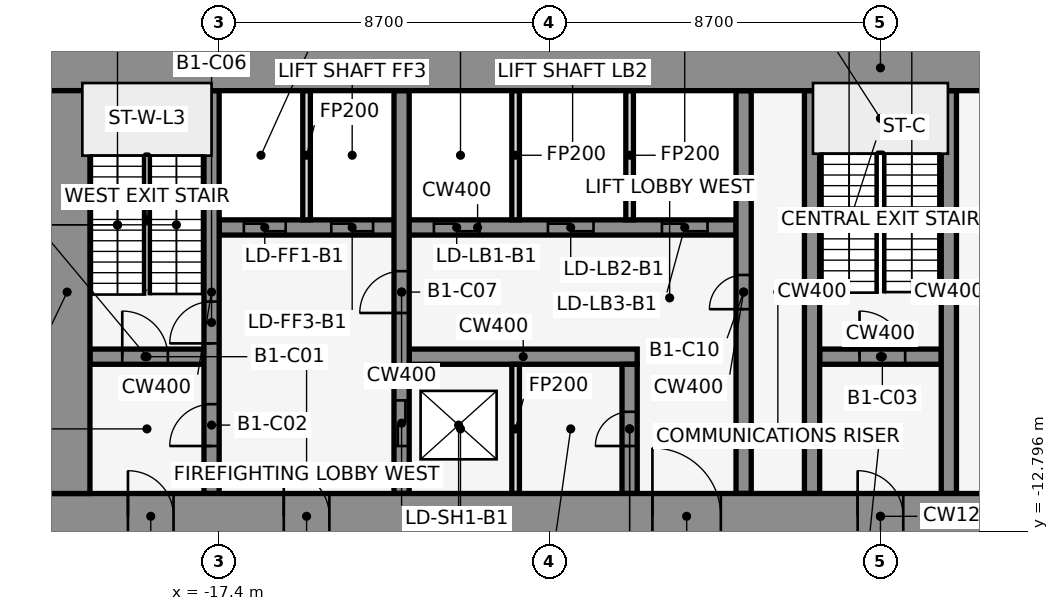
"""IFC4 building model, lengths in metres.
Left out: names, types, materials, properties, quantities, classifications, styles, units other than length and angle.
Written with IfcOpenShell. Run it as: python <this file> out.ifc"""

import sys

from ifc_helpers import new_model, si_unit, direction, frame, frame_2d, origin, place, context, subcontext, project, spatial, rectangle, extrude, element, fill, save


model = new_model("IFC4")
c1 = context("Model", 3, precision=1e-05, world=origin(), true_north=direction((0.0, 1.0)))
c2 = subcontext(c1, "Body", "Model", "MODEL_VIEW")
j1 = project(units=[si_unit("LENGTHUNIT", "METRE"), si_unit("PLANEANGLEUNIT", "RADIAN")], contexts=[c1])
p1 = place(None, origin())
s1 = spatial("IfcSite", under=j1, at=p1, CompositionType="ELEMENT")
p2 = place(p1, origin())
s2 = spatial("IfcBuilding", under=s1, at=p2, CompositionType="ELEMENT")
p3 = place(p2, frame((0.0, 0.0, -5.0)))
s3 = spatial("IfcBuildingStorey", under=s2, at=p3, CompositionType="ELEMENT", Elevation=-5.0)
p4 = place(p3, frame((-20.8, -8.2, 0.0), z_axis=(0.0, 0.0, 1.0), x_axis=(1.0, 0.0, 0.0)))
e1 = element("IfcWall", 1, at=p4, inside=s3, PredefinedType="SHEAR", context=c2, shape_type="SweptSolid", body=[
    extrude(rectangle(XDim=3.0, YDim=0.4, at=frame_2d((1.5, 0.0))), origin(), (0.0, 0.0, 1.0), 5.0),
])
p5 = place(p4, frame((0.85, 0.0, 0.0)))
e2 = element("IfcOpeningElement", 2, at=p5, cuts=e1, PredefinedType="OPENING", context=c2, shape_type="SweptSolid", body=[
    extrude(rectangle(XDim=1.2, YDim=2.1, at=frame_2d((0.6, 1.05))), frame((0.0, 0.212, 0.0), z_axis=(0.0, -1.0, 0.0), x_axis=(1.0, 0.0, 0.0)), (0.0, 0.0, 1.0), 0.424),
])
p6 = place(p3, frame((-12.4, -8.2, 0.0), z_axis=(0.0, 0.0, 1.0), x_axis=(1.0, 0.0, 0.0)))
e3 = element("IfcWall", 3, at=p6, inside=s3, PredefinedType="SHEAR", context=c2, shape_type="SweptSolid", body=[
    extrude(rectangle(XDim=6.0, YDim=0.4, at=frame_2d((3.0, 0.0))), origin(), (0.0, 0.0, 1.0), 5.0),
])
p7 = place(p3, frame((-1.6, -8.2, 0.0), z_axis=(0.0, 0.0, 1.0), x_axis=(1.0, 0.0, 0.0)))
e4 = element("IfcWall", 4, at=p7, inside=s3, PredefinedType="SHEAR", context=c2, shape_type="SweptSolid", body=[
    extrude(rectangle(XDim=3.2, YDim=0.4, at=frame_2d((1.6, 0.0))), origin(), (0.0, 0.0, 1.0), 5.0),
])
p8 = place(p7, frame((1.05, 0.0, 0.0)))
e5 = element("IfcOpeningElement", 5, at=p8, cuts=e4, PredefinedType="OPENING", context=c2, shape_type="SweptSolid", body=[
    extrude(rectangle(XDim=1.2, YDim=2.1, at=frame_2d((0.6, 1.05))), frame((0.0, 0.212, 0.0), z_axis=(0.0, -1.0, 0.0), x_axis=(1.0, 0.0, 0.0)), (0.0, 0.0, 1.0), 0.424),
])
p9 = place(p3, frame((-17.4, -4.8, 0.0), z_axis=(0.0, 0.0, 1.0), x_axis=(1.0, 0.0, 0.0)))
e6 = element("IfcWall", 6, at=p9, inside=s3, PredefinedType="SHEAR", context=c2, shape_type="SweptSolid", body=[
    extrude(rectangle(XDim=13.6, YDim=0.4, at=frame_2d((6.8, 0.0))), origin(), (0.0, 0.0, 1.0), 5.0),
])
p10 = place(p9, frame((0.65, 0.0, 0.0)))
e7 = element("IfcOpeningElement", 7, at=p10, cuts=e6, PredefinedType="OPENING", context=c2, shape_type="SweptSolid", body=[
    extrude(rectangle(XDim=1.1, YDim=2.1, at=frame_2d((0.55, 1.05))), frame((0.0, 0.212, 0.0), z_axis=(0.0, -1.0, 0.0), x_axis=(1.0, 0.0, 0.0)), (0.0, 0.0, 1.0), 0.424),
])
p11 = place(p9, frame((2.95, 0.0, 0.0)))
e8 = element("IfcOpeningElement", 8, at=p11, cuts=e6, PredefinedType="OPENING", context=c2, shape_type="SweptSolid", body=[
    extrude(rectangle(XDim=1.1, YDim=2.1, at=frame_2d((0.55, 1.05))), frame((0.0, 0.212, 0.0), z_axis=(0.0, -1.0, 0.0), x_axis=(1.0, 0.0, 0.0)), (0.0, 0.0, 1.0), 0.424),
])
p12 = place(p9, frame((5.65, 0.0, 0.0)))
e9 = element("IfcOpeningElement", 9, at=p12, cuts=e6, PredefinedType="OPENING", context=c2, shape_type="SweptSolid", body=[
    extrude(rectangle(XDim=1.2, YDim=2.1, at=frame_2d((0.6, 1.05))), frame((0.0, 0.212, 0.0), z_axis=(0.0, -1.0, 0.0), x_axis=(1.0, 0.0, 0.0)), (0.0, 0.0, 1.0), 0.424),
])
p13 = place(p9, frame((8.65, 0.0, 0.0)))
e10 = element("IfcOpeningElement", 10, at=p13, cuts=e6, PredefinedType="OPENING", context=c2, shape_type="SweptSolid", body=[
    extrude(rectangle(XDim=1.2, YDim=2.1, at=frame_2d((0.6, 1.05))), frame((0.0, 0.212, 0.0), z_axis=(0.0, -1.0, 0.0), x_axis=(1.0, 0.0, 0.0)), (0.0, 0.0, 1.0), 0.424),
])
p14 = place(p9, frame((11.65, 0.0, 0.0)))
e11 = element("IfcOpeningElement", 11, at=p14, cuts=e6, PredefinedType="OPENING", context=c2, shape_type="SweptSolid", body=[
    extrude(rectangle(XDim=1.2, YDim=2.1, at=frame_2d((0.6, 1.05))), frame((0.0, 0.212, 0.0), z_axis=(0.0, -1.0, 0.0), x_axis=(1.0, 0.0, 0.0)), (0.0, 0.0, 1.0), 0.424),
])
p15 = place(p3, frame((-17.6, -11.8, 0.0), z_axis=(0.0, 0.0, 1.0), x_axis=(0.0, 1.0, 0.0)))
e12 = element("IfcWall", 12, at=p15, inside=s3, PredefinedType="SHEAR", context=c2, shape_type="SweptSolid", body=[
    extrude(rectangle(XDim=10.6, YDim=0.4, at=frame_2d((5.3, 0.0))), origin(), (0.0, 0.0, 1.0), 5.0),
])
p16 = place(p15, frame((1.25, 0.0, 0.0)))
e13 = element("IfcOpeningElement", 13, at=p16, cuts=e12, PredefinedType="OPENING", context=c2, shape_type="SweptSolid", body=[
    extrude(rectangle(XDim=1.1, YDim=2.1, at=frame_2d((0.55, 1.05))), frame((0.0, 0.212, 0.0), z_axis=(0.0, -1.0, 0.0), x_axis=(1.0, 0.0, 0.0)), (0.0, 0.0, 1.0), 0.424),
])
p17 = place(p15, frame((3.95, 0.0, 0.0)))
e14 = element("IfcOpeningElement", 14, at=p17, cuts=e12, PredefinedType="OPENING", context=c2, shape_type="SweptSolid", body=[
    extrude(rectangle(XDim=1.1, YDim=2.1, at=frame_2d((0.55, 1.05))), frame((0.0, 0.212, 0.0), z_axis=(0.0, -1.0, 0.0), x_axis=(1.0, 0.0, 0.0)), (0.0, 0.0, 1.0), 0.424),
])
p18 = place(p3, frame((-15.1, -4.6, 0.0), z_axis=(0.0, 0.0, 1.0), x_axis=(0.0, 1.0, 0.0)))
e15 = element("IfcWall", 15, at=p18, inside=s3, PredefinedType="PARTITIONING", context=c2, shape_type="SweptSolid", body=[
    extrude(rectangle(XDim=3.4, YDim=0.2, at=frame_2d((1.7, 0.0))), origin(), (0.0, 0.0, 1.0), 4.7),
])
p19 = place(p3, frame((-12.6, -11.8, 0.0), z_axis=(0.0, 0.0, 1.0), x_axis=(0.0, 1.0, 0.0)))
e16 = element("IfcWall", 16, at=p19, inside=s3, PredefinedType="SHEAR", context=c2, shape_type="SweptSolid", body=[
    extrude(rectangle(XDim=10.6, YDim=0.4, at=frame_2d((5.3, 0.0))), origin(), (0.0, 0.0, 1.0), 5.0),
])
p20 = place(p19, frame((1.25, 0.0, 0.0)))
e17 = element("IfcOpeningElement", 17, at=p20, cuts=e16, PredefinedType="OPENING", context=c2, shape_type="SweptSolid", body=[
    extrude(rectangle(XDim=1.2, YDim=2.1, at=frame_2d((0.6, 1.05))), frame((0.0, 0.212, 0.0), z_axis=(0.0, -1.0, 0.0), x_axis=(1.0, 0.0, 0.0)), (0.0, 0.0, 1.0), 0.424),
])
p21 = place(p19, frame((4.75, 0.0, 0.0)))
e18 = element("IfcOpeningElement", 18, at=p21, cuts=e16, PredefinedType="OPENING", context=c2, shape_type="SweptSolid", body=[
    extrude(rectangle(XDim=1.1, YDim=2.1, at=frame_2d((0.55, 1.05))), frame((0.0, 0.212, 0.0), z_axis=(0.0, -1.0, 0.0), x_axis=(1.0, 0.0, 0.0)), (0.0, 0.0, 1.0), 0.424),
])
for number, where, z_axis, x_axis in (
    (19, (-9.6, -11.8, 0.0), (0.0, 0.0, 1.0), (0.0, 1.0, 0.0)),
    (20, (-9.6, -4.6, 0.0), (0.0, 0.0, 1.0), (0.0, 1.0, 0.0)),
):
    element("IfcWall", number, at=place(p3, frame(where, z_axis=z_axis, x_axis=x_axis)), inside=s3, PredefinedType="PARTITIONING", context=c2, shape_type="SweptSolid", body=[
        extrude(rectangle(XDim=3.4, YDim=0.2, at=frame_2d((1.7, 0.0))), origin(), (0.0, 0.0, 1.0), 4.7),
    ])
p22 = place(p3, frame((-6.6, -11.8, 0.0), z_axis=(0.0, 0.0, 1.0), x_axis=(0.0, 1.0, 0.0)))
e21 = element("IfcWall", 21, at=p22, inside=s3, PredefinedType="SHEAR", context=c2, shape_type="SweptSolid", body=[
    extrude(rectangle(XDim=3.4, YDim=0.4, at=frame_2d((1.7, 0.0))), origin(), (0.0, 0.0, 1.0), 5.0),
])
p23 = place(p22, frame((1.25, 0.0, 0.0)))
e22 = element("IfcOpeningElement", 22, at=p23, cuts=e21, PredefinedType="OPENING", context=c2, shape_type="SweptSolid", body=[
    extrude(rectangle(XDim=0.9, YDim=2.1, at=frame_2d((0.45, 1.05))), frame((0.0, 0.212, 0.0), z_axis=(0.0, -1.0, 0.0), x_axis=(1.0, 0.0, 0.0)), (0.0, 0.0, 1.0), 0.424),
])
p24 = place(p3, frame((-6.6, -4.6, 0.0), z_axis=(0.0, 0.0, 1.0), x_axis=(0.0, 1.0, 0.0)))
e23 = element("IfcWall", 23, at=p24, inside=s3, PredefinedType="PARTITIONING", context=c2, shape_type="SweptSolid", body=[
    extrude(rectangle(XDim=3.4, YDim=0.2, at=frame_2d((1.7, 0.0))), origin(), (0.0, 0.0, 1.0), 4.7),
])
p25 = place(p3, frame((-3.6, -11.8, 0.0), z_axis=(0.0, 0.0, 1.0), x_axis=(0.0, 1.0, 0.0)))
e24 = element("IfcWall", 24, at=p25, inside=s3, PredefinedType="SHEAR", context=c2, shape_type="SweptSolid", body=[
    extrude(rectangle(XDim=10.6, YDim=0.4, at=frame_2d((5.3, 0.0))), origin(), (0.0, 0.0, 1.0), 5.0),
])
p26 = place(p25, frame((4.85, 0.0, 0.0)))
e25 = element("IfcOpeningElement", 25, at=p26, cuts=e24, PredefinedType="OPENING", context=c2, shape_type="SweptSolid", body=[
    extrude(rectangle(XDim=0.9, YDim=2.1, at=frame_2d((0.45, 1.05))), frame((0.0, 0.212, 0.0), z_axis=(0.0, -1.0, 0.0), x_axis=(1.0, 0.0, 0.0)), (0.0, 0.0, 1.0), 0.424),
])
for number, where, z_axis, x_axis in (
    (26, (-1.8, -11.8, 0.0), (0.0, 0.0, 1.0), (0.0, 1.0, 0.0)),
    (27, (1.8, -11.8, 0.0), (0.0, 0.0, 1.0), (0.0, 1.0, 0.0)),
):
    element("IfcWall", number, at=place(p3, frame(where, z_axis=z_axis, x_axis=x_axis)), inside=s3, PredefinedType="SHEAR", context=c2, shape_type="SweptSolid", body=[
        extrude(rectangle(XDim=10.6, YDim=0.4, at=frame_2d((5.3, 0.0))), origin(), (0.0, 0.0, 1.0), 5.0),
    ])
p27 = place(p3, frame((-22.0, -0.6, 0.0), z_axis=(0.0, 0.0, 1.0), x_axis=(1.0, 0.0, 0.0)))
e28 = element("IfcWall", 28, at=p27, inside=s3, PredefinedType="SHEAR", context=c2, shape_type="SweptSolid", body=[
    extrude(rectangle(XDim=44.0, YDim=1.2, at=frame_2d((22.0, 0.0))), origin(), (0.0, 0.0, 1.0), 5.0),
])
p28 = place(p3, frame((-22.0, -12.4, 0.0), z_axis=(0.0, 0.0, 1.0), x_axis=(1.0, 0.0, 0.0)))
e29 = element("IfcWall", 29, at=p28, inside=s3, PredefinedType="SHEAR", context=c2, shape_type="SweptSolid", body=[
    extrude(rectangle(XDim=44.0, YDim=1.2, at=frame_2d((22.0, 0.0))), origin(), (0.0, 0.0, 1.0), 5.0),
])
p29 = place(p28, frame((2.2, 0.0, 0.0)))
e30 = element("IfcOpeningElement", 30, at=p29, cuts=e29, PredefinedType="OPENING", context=c2, shape_type="SweptSolid", body=[
    extrude(rectangle(XDim=1.2, YDim=2.1, at=frame_2d((0.6, 1.05))), frame((0.0, 0.612, 0.0), z_axis=(0.0, -1.0, 0.0), x_axis=(1.0, 0.0, 0.0)), (0.0, 0.0, 1.0), 1.224),
])
p30 = place(p28, frame((21.4, 0.0, 0.0)))
e31 = element("IfcOpeningElement", 31, at=p30, cuts=e29, PredefinedType="OPENING", context=c2, shape_type="SweptSolid", body=[
    extrude(rectangle(XDim=1.2, YDim=2.1, at=frame_2d((0.6, 1.05))), frame((0.0, 0.612, 0.0), z_axis=(0.0, -1.0, 0.0), x_axis=(1.0, 0.0, 0.0)), (0.0, 0.0, 1.0), 1.224),
])
p31 = place(p28, frame((40.6, 0.0, 0.0)))
e32 = element("IfcOpeningElement", 32, at=p31, cuts=e29, PredefinedType="OPENING", context=c2, shape_type="SweptSolid", body=[
    extrude(rectangle(XDim=1.2, YDim=2.1, at=frame_2d((0.6, 1.05))), frame((0.0, 0.612, 0.0), z_axis=(0.0, -1.0, 0.0), x_axis=(1.0, 0.0, 0.0)), (0.0, 0.0, 1.0), 1.224),
])
p32 = place(p28, frame((16.0, 0.0, 0.0)))
e33 = element("IfcOpeningElement", 33, at=p32, cuts=e29, PredefinedType="OPENING", context=c2, shape_type="SweptSolid", body=[
    extrude(rectangle(XDim=1.8, YDim=2.1, at=frame_2d((0.9, 1.05))), frame((0.0, 0.612, 0.0), z_axis=(0.0, -1.0, 0.0), x_axis=(1.0, 0.0, 0.0)), (0.0, 0.0, 1.0), 1.224),
])
p33 = place(p28, frame((6.3, 0.0, 0.0)))
e34 = element("IfcOpeningElement", 34, at=p33, cuts=e29, PredefinedType="OPENING", context=c2, shape_type="SweptSolid", body=[
    extrude(rectangle(XDim=1.2, YDim=2.1, at=frame_2d((0.6, 1.05))), frame((0.0, 0.612, 0.0), z_axis=(0.0, -1.0, 0.0), x_axis=(1.0, 0.0, 0.0)), (0.0, 0.0, 1.0), 1.224),
])
p34 = place(p28, frame((26.2, 0.0, 0.0)))
e35 = element("IfcOpeningElement", 35, at=p34, cuts=e29, PredefinedType="OPENING", context=c2, shape_type="SweptSolid", body=[
    extrude(rectangle(XDim=1.8, YDim=2.1, at=frame_2d((0.9, 1.05))), frame((0.0, 0.612, 0.0), z_axis=(0.0, -1.0, 0.0), x_axis=(1.0, 0.0, 0.0)), (0.0, 0.0, 1.0), 1.224),
])
p35 = place(p28, frame((36.5, 0.0, 0.0)))
e36 = element("IfcOpeningElement", 36, at=p35, cuts=e29, PredefinedType="OPENING", context=c2, shape_type="SweptSolid", body=[
    extrude(rectangle(XDim=1.2, YDim=2.1, at=frame_2d((0.6, 1.05))), frame((0.0, 0.612, 0.0), z_axis=(0.0, -1.0, 0.0), x_axis=(1.0, 0.0, 0.0)), (0.0, 0.0, 1.0), 1.224),
])
p36 = place(p3, frame((-21.4, -11.8, 0.0), z_axis=(0.0, 0.0, 1.0), x_axis=(0.0, 1.0, 0.0)))
e37 = element("IfcWall", 37, at=p36, inside=s3, PredefinedType="SHEAR", context=c2, shape_type="SweptSolid", body=[
    extrude(rectangle(XDim=10.6, YDim=1.2, at=frame_2d((5.3, 0.0))), origin(), (0.0, 0.0, 1.0), 5.0),
])
p37 = place(p5, origin())
e38 = element("IfcDoor", 38, at=p37, inside=s3, OperationType="SINGLE_SWING_LEFT", PredefinedType="DOOR", context=c2, shape_type="SweptSolid", body=[
    extrude(rectangle(XDim=1.2, YDim=2.1, at=frame_2d((0.6, 1.05))), frame((0.0, 0.025, 0.0), z_axis=(0.0, -1.0, 0.0), x_axis=(1.0, 0.0, 0.0)), (0.0, 0.0, 1.0), 0.05),
])
fill(e2, e38)
p38 = place(p16, frame((1.1, 0.0, 0.0), z_axis=(0.0, 0.0, 1.0), x_axis=(-1.0, 0.0, 0.0)))
e39 = element("IfcDoor", 39, at=p38, inside=s3, OperationType="SINGLE_SWING_LEFT", PredefinedType="DOOR", context=c2, shape_type="SweptSolid", body=[
    extrude(rectangle(XDim=1.1, YDim=2.1, at=frame_2d((0.55, 1.05))), frame((0.0, 0.025, 0.0), z_axis=(0.0, -1.0, 0.0), x_axis=(1.0, 0.0, 0.0)), (0.0, 0.0, 1.0), 0.05),
])
fill(e13, e39)
p39 = place(p8, origin())
e40 = element("IfcDoor", 40, at=p39, inside=s3, OperationType="SINGLE_SWING_LEFT", PredefinedType="DOOR", context=c2, shape_type="SweptSolid", body=[
    extrude(rectangle(XDim=1.2, YDim=2.1, at=frame_2d((0.6, 1.05))), frame((0.0, 0.025, 0.0), z_axis=(0.0, -1.0, 0.0), x_axis=(1.0, 0.0, 0.0)), (0.0, 0.0, 1.0), 0.05),
])
fill(e5, e40)
p40 = place(p10, origin())
e41 = element("IfcDoor", 41, at=p40, inside=s3, OperationType="DOUBLE_DOOR_SLIDING", PredefinedType="DOOR", context=c2, shape_type="SweptSolid", body=[
    extrude(rectangle(XDim=1.1, YDim=2.1, at=frame_2d((0.55, 1.05))), frame((0.0, 0.025, 0.0), z_axis=(0.0, -1.0, 0.0), x_axis=(1.0, 0.0, 0.0)), (0.0, 0.0, 1.0), 0.05),
])
fill(e7, e41)
p41 = place(p11, origin())
e42 = element("IfcDoor", 42, at=p41, inside=s3, OperationType="DOUBLE_DOOR_SLIDING", PredefinedType="DOOR", context=c2, shape_type="SweptSolid", body=[
    extrude(rectangle(XDim=1.1, YDim=2.1, at=frame_2d((0.55, 1.05))), frame((0.0, 0.025, 0.0), z_axis=(0.0, -1.0, 0.0), x_axis=(1.0, 0.0, 0.0)), (0.0, 0.0, 1.0), 0.05),
])
fill(e8, e42)
p42 = place(p12, origin())
e43 = element("IfcDoor", 43, at=p42, inside=s3, OperationType="DOUBLE_DOOR_SLIDING", PredefinedType="DOOR", context=c2, shape_type="SweptSolid", body=[
    extrude(rectangle(XDim=1.2, YDim=2.1, at=frame_2d((0.6, 1.05))), frame((0.0, 0.025, 0.0), z_axis=(0.0, -1.0, 0.0), x_axis=(1.0, 0.0, 0.0)), (0.0, 0.0, 1.0), 0.05),
])
fill(e9, e43)
p43 = place(p13, origin())
e44 = element("IfcDoor", 44, at=p43, inside=s3, OperationType="DOUBLE_DOOR_SLIDING", PredefinedType="DOOR", context=c2, shape_type="SweptSolid", body=[
    extrude(rectangle(XDim=1.2, YDim=2.1, at=frame_2d((0.6, 1.05))), frame((0.0, 0.025, 0.0), z_axis=(0.0, -1.0, 0.0), x_axis=(1.0, 0.0, 0.0)), (0.0, 0.0, 1.0), 0.05),
])
fill(e10, e44)
p44 = place(p14, origin())
e45 = element("IfcDoor", 45, at=p44, inside=s3, OperationType="DOUBLE_DOOR_SLIDING", PredefinedType="DOOR", context=c2, shape_type="SweptSolid", body=[
    extrude(rectangle(XDim=1.2, YDim=2.1, at=frame_2d((0.6, 1.05))), frame((0.0, 0.025, 0.0), z_axis=(0.0, -1.0, 0.0), x_axis=(1.0, 0.0, 0.0)), (0.0, 0.0, 1.0), 0.05),
])
fill(e11, e45)
p45 = place(p20, origin())
e46 = element("IfcDoor", 46, at=p45, inside=s3, OperationType="DOUBLE_DOOR_SLIDING", PredefinedType="DOOR", context=c2, shape_type="SweptSolid", body=[
    extrude(rectangle(XDim=1.2, YDim=2.1, at=frame_2d((0.6, 1.05))), frame((0.0, 0.025, 0.0), z_axis=(0.0, -1.0, 0.0), x_axis=(1.0, 0.0, 0.0)), (0.0, 0.0, 1.0), 0.05),
])
fill(e17, e46)
p46 = place(p17, frame((1.1, 0.0, 0.0), z_axis=(0.0, 0.0, 1.0), x_axis=(-1.0, 0.0, 0.0)))
e47 = element("IfcDoor", 47, at=p46, inside=s3, OperationType="SINGLE_SWING_LEFT", PredefinedType="DOOR", context=c2, shape_type="SweptSolid", body=[
    extrude(rectangle(XDim=1.1, YDim=2.1, at=frame_2d((0.55, 1.05))), frame((0.0, 0.025, 0.0), z_axis=(0.0, -1.0, 0.0), x_axis=(1.0, 0.0, 0.0)), (0.0, 0.0, 1.0), 0.05),
])
fill(e14, e47)
p47 = place(p21, origin())
e48 = element("IfcDoor", 48, at=p47, inside=s3, OperationType="SINGLE_SWING_LEFT", PredefinedType="DOOR", context=c2, shape_type="SweptSolid", body=[
    extrude(rectangle(XDim=1.1, YDim=2.1, at=frame_2d((0.55, 1.05))), frame((0.0, 0.025, 0.0), z_axis=(0.0, -1.0, 0.0), x_axis=(1.0, 0.0, 0.0)), (0.0, 0.0, 1.0), 0.05),
])
fill(e18, e48)
p48 = place(p26, frame((0.9, 0.0, 0.0), z_axis=(0.0, 0.0, 1.0), x_axis=(-1.0, 0.0, 0.0)))
e49 = element("IfcDoor", 49, at=p48, inside=s3, OperationType="SINGLE_SWING_LEFT", PredefinedType="DOOR", context=c2, shape_type="SweptSolid", body=[
    extrude(rectangle(XDim=0.9, YDim=2.1, at=frame_2d((0.45, 1.05))), frame((0.0, 0.025, 0.0), z_axis=(0.0, -1.0, 0.0), x_axis=(1.0, 0.0, 0.0)), (0.0, 0.0, 1.0), 0.05),
])
fill(e25, e49)
p49 = place(p23, origin())
e50 = element("IfcDoor", 50, at=p49, inside=s3, OperationType="SINGLE_SWING_LEFT", PredefinedType="DOOR", context=c2, shape_type="SweptSolid", body=[
    extrude(rectangle(XDim=0.9, YDim=2.1, at=frame_2d((0.45, 1.05))), frame((0.0, 0.025, 0.0), z_axis=(0.0, -1.0, 0.0), x_axis=(1.0, 0.0, 0.0)), (0.0, 0.0, 1.0), 0.05),
])
fill(e22, e50)
p50 = place(p29, frame((1.2, 0.0, 0.0), z_axis=(0.0, 0.0, 1.0), x_axis=(-1.0, 0.0, 0.0)))
e51 = element("IfcDoor", 51, at=p50, inside=s3, OperationType="SINGLE_SWING_RIGHT", PredefinedType="DOOR", context=c2, shape_type="SweptSolid", body=[
    extrude(rectangle(XDim=1.2, YDim=2.1, at=frame_2d((0.6, 1.05))), frame((0.0, 0.025, 0.0), z_axis=(0.0, -1.0, 0.0), x_axis=(1.0, 0.0, 0.0)), (0.0, 0.0, 1.0), 0.05),
])
fill(e30, e51)
p51 = place(p30, frame((1.2, 0.0, 0.0), z_axis=(0.0, 0.0, 1.0), x_axis=(-1.0, 0.0, 0.0)))
e52 = element("IfcDoor", 52, at=p51, inside=s3, OperationType="SINGLE_SWING_RIGHT", PredefinedType="DOOR", context=c2, shape_type="SweptSolid", body=[
    extrude(rectangle(XDim=1.2, YDim=2.1, at=frame_2d((0.6, 1.05))), frame((0.0, 0.025, 0.0), z_axis=(0.0, -1.0, 0.0), x_axis=(1.0, 0.0, 0.0)), (0.0, 0.0, 1.0), 0.05),
])
fill(e31, e52)
p52 = place(p32, origin())
e53 = element("IfcDoor", 53, at=p52, inside=s3, OperationType="SINGLE_SWING_LEFT", PredefinedType="DOOR", context=c2, shape_type="SweptSolid", body=[
    extrude(rectangle(XDim=1.8, YDim=2.1, at=frame_2d((0.9, 1.05))), frame((0.0, 0.025, 0.0), z_axis=(0.0, -1.0, 0.0), x_axis=(1.0, 0.0, 0.0)), (0.0, 0.0, 1.0), 0.05),
])
fill(e33, e53)
p53 = place(p33, frame((1.2, 0.0, 0.0), z_axis=(0.0, 0.0, 1.0), x_axis=(-1.0, 0.0, 0.0)))
e54 = element("IfcDoor", 54, at=p53, inside=s3, OperationType="SINGLE_SWING_RIGHT", PredefinedType="DOOR", context=c2, shape_type="SweptSolid", body=[
    extrude(rectangle(XDim=1.2, YDim=2.1, at=frame_2d((0.6, 1.05))), frame((0.0, 0.025, 0.0), z_axis=(0.0, -1.0, 0.0), x_axis=(1.0, 0.0, 0.0)), (0.0, 0.0, 1.0), 0.05),
])
fill(e34, e54)
save(model, sys.argv[1])
